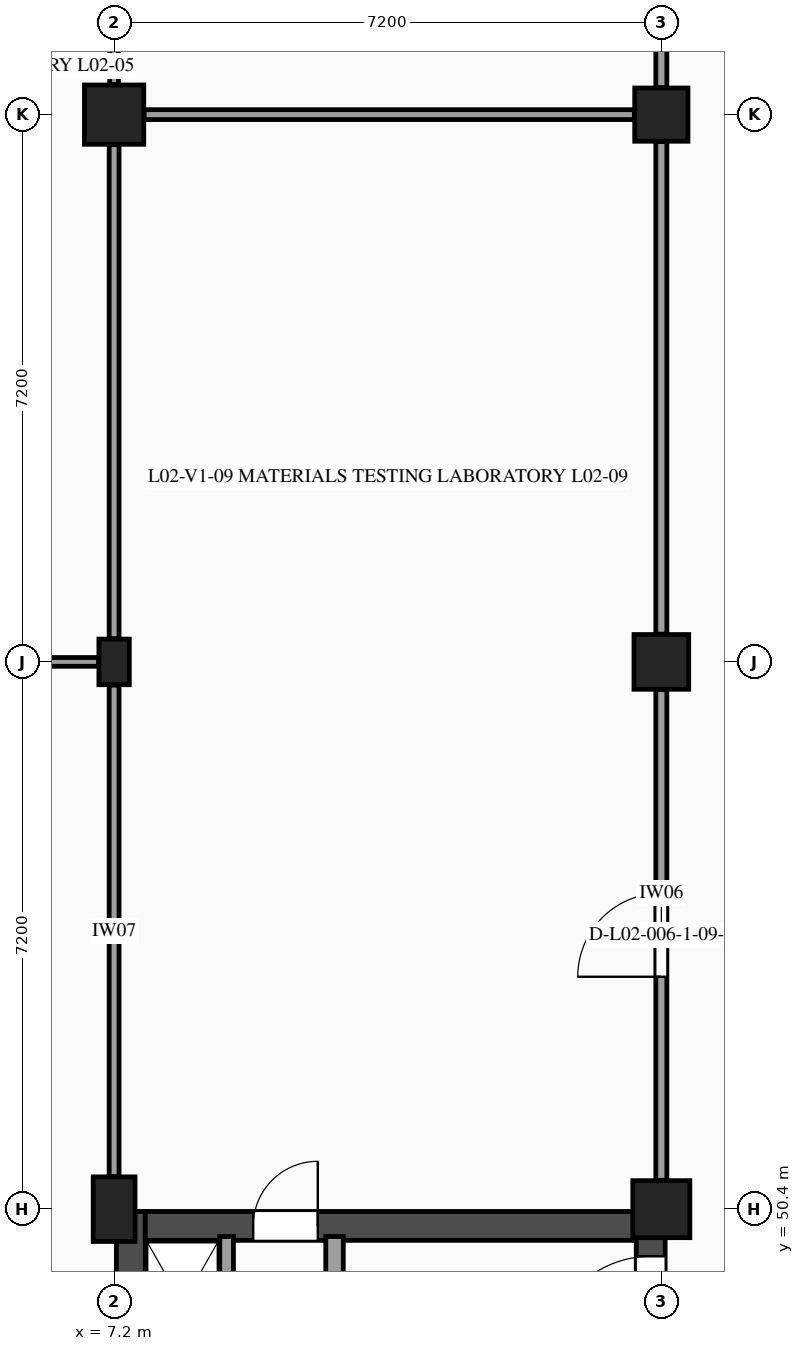
"""IFC4 building model, lengths in metres.
Left out: names, types, materials, properties, quantities, classifications, styles, units other than length and angle.
Written with IfcOpenShell. Run it as: python <this file> out.ifc"""

import sys

from ifc_helpers import new_model, si_unit, direction, frame, frame_2d, origin, origin_2d, place, context, subcontext, project, spatial, rectangle, extrude, element, fill, save


model = new_model("IFC4")
c1 = context("Model", 3, precision=1e-05, world=origin(), true_north=direction((0.0, 1.0)))
c2 = subcontext(c1, "Body", "Model", "MODEL_VIEW")
j1 = project(units=[si_unit("LENGTHUNIT", "METRE"), si_unit("PLANEANGLEUNIT", "RADIAN")], contexts=[c1])
p1 = place(None, origin())
s1 = spatial("IfcSite", under=j1, at=p1, CompositionType="ELEMENT")
p2 = place(p1, origin())
s2 = spatial("IfcBuilding", under=s1, at=p2, CompositionType="ELEMENT")
p3 = place(p2, frame((0.0, 0.0, 9.9)))
s3 = spatial("IfcBuildingStorey", under=s2, at=p3, CompositionType="ELEMENT", Elevation=9.9)
p4 = place(p3, frame((7.2, 50.4, 0.0), z_axis=(0.0, 0.0, 1.0), x_axis=(1.0, 0.0, 0.0)))
e1 = element("IfcColumn", 1, at=p4, inside=s3, PredefinedType="COLUMN", context=c2, shape_type="SweptSolid", body=[
    extrude(rectangle(XDim=0.55, YDim=0.85, at=origin_2d()), origin(), (0.0, 0.0, 1.0), 4.5),
])
p5 = place(p3, frame((7.2, 57.6, 0.0), z_axis=(0.0, 0.0, 1.0), x_axis=(1.0, 0.0, 0.0)))
e2 = element("IfcColumn", 2, at=p5, inside=s3, PredefinedType="PILASTER", context=c2, shape_type="SweptSolid", body=[
    extrude(rectangle(XDim=0.4, YDim=0.6, at=origin_2d()), origin(), (0.0, 0.0, 1.0), 4.5),
])
p6 = place(p3, frame((7.2, 64.8, 0.0), z_axis=(0.0, 0.0, 1.0), x_axis=(1.0, 0.0, 0.0)))
e3 = element("IfcColumn", 3, at=p6, inside=s3, PredefinedType="COLUMN", context=c2, shape_type="SweptSolid", body=[
    extrude(rectangle(XDim=0.78, YDim=0.78, at=origin_2d()), origin(), (0.0, 0.0, 1.0), 4.5),
])
p7 = place(p3, frame((14.4, 50.4, 0.0), z_axis=(0.0, 0.0, 1.0), x_axis=(1.0, 0.0, 0.0)))
e4 = element("IfcColumn", 4, at=p7, inside=s3, PredefinedType="COLUMN", context=c2, shape_type="SweptSolid", body=[
    extrude(rectangle(XDim=0.75, YDim=0.75, at=origin_2d()), origin(), (0.0, 0.0, 1.0), 4.5),
])
p8 = place(p3, frame((14.4, 57.6, 0.0), z_axis=(0.0, 0.0, 1.0), x_axis=(1.0, 0.0, 0.0)))
e5 = element("IfcColumn", 5, at=p8, inside=s3, PredefinedType="COLUMN", context=c2, shape_type="SweptSolid", body=[
    extrude(rectangle(XDim=0.72, YDim=0.72, at=origin_2d()), origin(), (0.0, 0.0, 1.0), 4.5),
])
p9 = place(p3, frame((14.4, 64.8, 0.0), z_axis=(0.0, 0.0, 1.0), x_axis=(1.0, 0.0, 0.0)))
e6 = element("IfcColumn", 6, at=p9, inside=s3, PredefinedType="COLUMN", context=c2, shape_type="SweptSolid", body=[
    extrude(rectangle(XDim=0.7, YDim=0.7, at=origin_2d()), origin(), (0.0, 0.0, 1.0), 4.5),
])
p10 = place(p3, frame((7.42, 50.37, 0.0), z_axis=(0.0, 0.0, 1.0), x_axis=(0.0, -1.0, 0.0)))
e7 = element("IfcWall", 7, at=p10, inside=s3, PredefinedType="SHEAR", context=c2, shape_type="SweptSolid", body=[
    extrude(rectangle(XDim=7.14, YDim=0.38, at=frame_2d((3.57, 0.0))), origin(), (0.0, 0.0, 1.0), 4.225),
])
p11 = place(p3, frame((7.61, 50.18, 0.0), z_axis=(0.0, 0.0, 1.0), x_axis=(1.0, 0.0, 0.0)))
e8 = element("IfcWall", 8, at=p11, inside=s3, PredefinedType="SHEAR", context=c2, shape_type="SweptSolid", body=[
    extrude(rectangle(XDim=6.46, YDim=0.38, at=frame_2d((3.23, 0.0))), origin(), (0.0, 0.0, 1.0), 4.225),
])
p12 = place(p11, frame((1.42, 0.0, 0.0)))
e9 = element("IfcOpeningElement", 9, at=p12, cuts=e8, PredefinedType="OPENING", context=c2, shape_type="SweptSolid", body=[
    extrude(rectangle(XDim=0.85, YDim=2.1, at=frame_2d((0.425, 1.05))), frame((0.0, 0.2, 0.0), z_axis=(0.0, -1.0, 0.0), x_axis=(1.0, 0.0, 0.0)), (0.0, 0.0, 1.0), 0.4),
])
p13 = place(p3, frame((10.1, 48.3, 0.0), z_axis=(0.0, 0.0, 1.0), x_axis=(0.0, 1.0, 0.0)))
e10 = element("IfcWall", 10, at=p13, inside=s3, PredefinedType="PARTITIONING", context=c2, shape_type="SweptSolid", body=[
    extrude(rectangle(XDim=1.74, YDim=0.23, at=frame_2d((0.87, 0.0))), origin(), (0.0, 0.0, 1.0), 4.225),
])
p14 = place(p3, frame((8.68, 48.28, 0.0), z_axis=(0.0, 0.0, 1.0), x_axis=(0.0, 1.0, 0.0)))
e11 = element("IfcWall", 11, at=p14, inside=s3, PredefinedType="PARTITIONING", context=c2, shape_type="SweptSolid", body=[
    extrude(rectangle(XDim=1.76, YDim=0.18, at=frame_2d((0.88, 0.0))), origin(), (0.0, 0.0, 1.0), 4.225),
])
p15 = place(p3, frame((14.26, 43.23, 0.0), z_axis=(0.0, 0.0, 1.0), x_axis=(0.0, 1.0, 0.0)))
e12 = element("IfcWall", 12, at=p15, inside=s3, PredefinedType="SHEAR", context=c2, shape_type="SweptSolid", body=[
    extrude(rectangle(XDim=7.14, YDim=0.38, at=frame_2d((3.57, 0.0))), origin(), (0.0, 0.0, 1.0), 4.225),
])
p16 = place(p15, frame((5.2, 0.0, 0.0)))
e13 = element("IfcOpeningElement", 13, at=p16, cuts=e12, PredefinedType="OPENING", context=c2, shape_type="SweptSolid", body=[
    extrude(rectangle(XDim=1.35, YDim=2.15, at=frame_2d((0.675, 1.075))), frame((0.0, 0.2, 0.0), z_axis=(0.0, -1.0, 0.0), x_axis=(1.0, 0.0, 0.0)), (0.0, 0.0, 1.0), 0.4),
])
p17 = place(p3, frame((7.2, 50.83, 0.0), z_axis=(0.0, 0.0, 1.0), x_axis=(0.0, 1.0, 0.0)))
e14 = element("IfcWall", 14, at=p17, inside=s3, PredefinedType="PARTITIONING", context=c2, shape_type="SweptSolid", body=[
    extrude(rectangle(XDim=6.465, YDim=0.13, at=frame_2d((3.232, 0.0))), origin(), (0.0, 0.0, 1.0), 3.54),
])
p18 = place(p3, frame((0.365, 57.6, 0.0), z_axis=(0.0, 0.0, 1.0), x_axis=(1.0, 0.0, 0.0)))
e15 = element("IfcWall", 15, at=p18, inside=s3, PredefinedType="PARTITIONING", context=c2, shape_type="SweptSolid", body=[
    extrude(rectangle(XDim=6.63, YDim=0.115, at=frame_2d((3.315, 0.0))), origin(), (0.0, 0.0, 1.0), 3.485),
])
p19 = place(p18, frame((2.725, 0.0, 0.0)))
e16 = element("IfcOpeningElement", 16, at=p19, cuts=e15, PredefinedType="OPENING", context=c2, shape_type="SweptSolid", body=[
    extrude(rectangle(XDim=1.18, YDim=2.18, at=frame_2d((0.59, 1.09))), frame((0.0, 0.067, 0.0), z_axis=(0.0, -1.0, 0.0), x_axis=(1.0, 0.0, 0.0)), (0.0, 0.0, 1.0), 0.135),
])
p20 = place(p3, frame((7.2, 57.905, 0.0), z_axis=(0.0, 0.0, 1.0), x_axis=(0.0, 1.0, 0.0)))
e17 = element("IfcWall", 17, at=p20, inside=s3, PredefinedType="PARTITIONING", context=c2, shape_type="SweptSolid", body=[
    extrude(rectangle(XDim=6.5, YDim=0.13, at=frame_2d((3.25, 0.0))), origin(), (0.0, 0.0, 1.0), 3.535),
])
p21 = place(p3, frame((7.2, 65.195, 0.0), z_axis=(0.0, 0.0, 1.0), x_axis=(0.0, 1.0, 0.0)))
e18 = element("IfcWall", 18, at=p21, inside=s3, PredefinedType="PARTITIONING", context=c2, shape_type="SweptSolid", body=[
    extrude(rectangle(XDim=6.425, YDim=0.115, at=frame_2d((3.212, 0.0))), origin(), (0.0, 0.0, 1.0), 3.53),
])
p22 = place(p3, frame((14.4, 50.78, 0.0), z_axis=(0.0, 0.0, 1.0), x_axis=(0.0, 1.0, 0.0)))
e19 = element("IfcWall", 19, at=p22, inside=s3, PredefinedType="PARTITIONING", context=c2, shape_type="SweptSolid", body=[
    extrude(rectangle(XDim=6.455, YDim=0.145, at=frame_2d((3.228, 0.0))), origin(), (0.0, 0.0, 1.0), 3.54),
])
p23 = place(p22, frame((2.677, 0.0, 0.0)))
e20 = element("IfcOpeningElement", 20, at=p23, cuts=e19, PredefinedType="OPENING", context=c2, shape_type="SweptSolid", body=[
    extrude(rectangle(XDim=1.1, YDim=2.15, at=frame_2d((0.55, 1.075))), frame((0.0, 0.083, 0.0), z_axis=(0.0, -1.0, 0.0), x_axis=(1.0, 0.0, 0.0)), (0.0, 0.0, 1.0), 0.165),
])
p24 = place(p3, frame((14.4, 57.965, 0.0), z_axis=(0.0, 0.0, 1.0), x_axis=(0.0, 1.0, 0.0)))
e21 = element("IfcWall", 21, at=p24, inside=s3, PredefinedType="PARTITIONING", context=c2, shape_type="SweptSolid", body=[
    extrude(rectangle(XDim=6.48, YDim=0.145, at=frame_2d((3.24, 0.0))), origin(), (0.0, 0.0, 1.0), 3.535),
])
p25 = place(p3, frame((7.595, 64.8, 0.0), z_axis=(0.0, 0.0, 1.0), x_axis=(1.0, 0.0, 0.0)))
e22 = element("IfcWall", 22, at=p25, inside=s3, PredefinedType="PARTITIONING", context=c2, shape_type="SweptSolid", body=[
    extrude(rectangle(XDim=6.45, YDim=0.13, at=frame_2d((3.225, 0.0))), origin(), (0.0, 0.0, 1.0), 3.5),
])
p26 = place(p3, frame((14.4, 65.155, 0.0), z_axis=(0.0, 0.0, 1.0), x_axis=(0.0, 1.0, 0.0)))
e23 = element("IfcWall", 23, at=p26, inside=s3, PredefinedType="PARTITIONING", context=c2, shape_type="SweptSolid", body=[
    extrude(rectangle(XDim=6.415, YDim=0.145, at=frame_2d((3.208, 0.0))), origin(), (0.0, 0.0, 1.0), 3.53),
])
p27 = place(p12, origin())
e24 = element("IfcDoor", 24, at=p27, inside=s3, OperationType="SINGLE_SWING_RIGHT", PredefinedType="DOOR", context=c2, shape_type="SweptSolid", body=[
    extrude(rectangle(XDim=0.85, YDim=2.1, at=frame_2d((0.425, 1.05))), frame((0.0, 0.025, 0.0), z_axis=(0.0, -1.0, 0.0), x_axis=(1.0, 0.0, 0.0)), (0.0, 0.0, 1.0), 0.05),
])
fill(e9, e24)
p28 = place(p16, origin())
e25 = element("IfcDoor", 25, at=p28, inside=s3, OperationType="SINGLE_SWING_LEFT", PredefinedType="DOOR", context=c2, shape_type="SweptSolid", body=[
    extrude(rectangle(XDim=1.35, YDim=2.15, at=frame_2d((0.675, 1.075))), frame((0.0, 0.025, 0.0), z_axis=(0.0, -1.0, 0.0), x_axis=(1.0, 0.0, 0.0)), (0.0, 0.0, 1.0), 0.05),
])
fill(e13, e25)
p29 = place(p23, origin())
e26 = element("IfcDoor", 26, at=p29, inside=s3, OperationType="SINGLE_SWING_LEFT", PredefinedType="DOOR", context=c2, shape_type="SweptSolid", body=[
    extrude(rectangle(XDim=1.1, YDim=2.15, at=frame_2d((0.55, 1.075))), frame((0.0, 0.025, 0.0), z_axis=(0.0, -1.0, 0.0), x_axis=(1.0, 0.0, 0.0)), (0.0, 0.0, 1.0), 0.05),
])
fill(e20, e26)
save(model, sys.argv[1])
